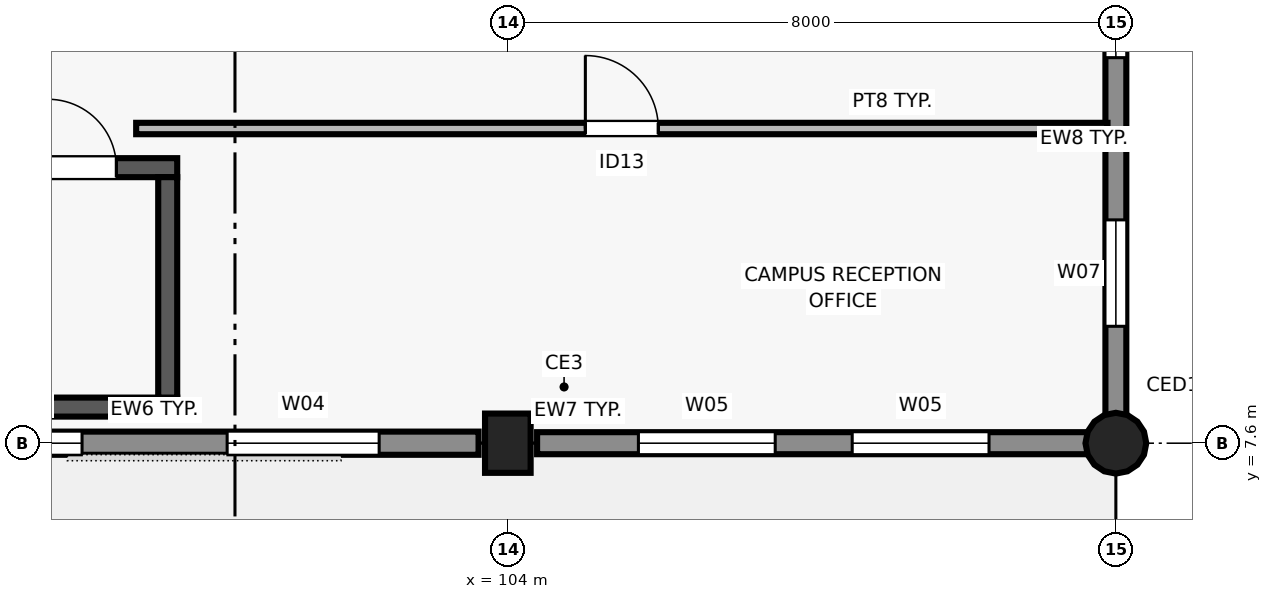
"""IFC4 building model, lengths in metres.
Left out: names, types, materials, properties, quantities, classifications, styles, units other than length and angle.
Written with IfcOpenShell. Run it as: python <this file> out.ifc"""

import sys

from ifc_helpers import new_model, si_unit, direction, frame, frame_2d, origin, origin_2d, place, context, subcontext, project, spatial, rectangle, circle, extrude, element, fill, save


model = new_model("IFC4")
c1 = context("Model", 3, precision=1e-05, world=origin(), true_north=direction((0.0, 1.0)))
c2 = subcontext(c1, "Body", "Model", "MODEL_VIEW")
j1 = project(units=[si_unit("LENGTHUNIT", "METRE"), si_unit("PLANEANGLEUNIT", "RADIAN")], contexts=[c1])
p1 = place(None, origin())
s1 = spatial("IfcSite", under=j1, at=p1, CompositionType="ELEMENT")
p2 = place(p1, origin())
s2 = spatial("IfcBuilding", under=s1, at=p2, CompositionType="ELEMENT")
p3 = place(p2, origin())
s3 = spatial("IfcBuildingStorey", under=s2, at=p3, CompositionType="ELEMENT", Elevation=0.0)
p4 = place(p3, frame((104.0, 7.6, 0.0), z_axis=(0.0, 0.0, 1.0), x_axis=(1.0, 0.0, 0.0)))
e1 = element("IfcColumn", 1, at=p4, inside=s3, PredefinedType="COLUMN", context=c2, shape_type="SweptSolid", body=[
    extrude(rectangle(XDim=0.78, YDim=0.6, at=origin_2d()), origin(), (0.0, 0.0, 1.0), 4.5),
])
p5 = place(p3, frame((112.0, 7.6, 0.0), z_axis=(0.0, 0.0, 1.0), x_axis=(1.0, 0.0, 0.0)))
e2 = element("IfcColumn", 2, at=p5, inside=s3, PredefinedType="COLUMN", context=c2, shape_type="SweptSolid", body=[
    extrude(circle(Radius=0.4, at=origin_2d()), origin(), (0.0, 0.0, 1.0), 4.5),
])
p6 = place(p3, frame((96.395, 7.6, 0.0), z_axis=(0.0, 0.0, 1.0), x_axis=(1.0, 0.0, 0.0)))
e3 = element("IfcWall", 3, at=p6, inside=s3, PredefinedType="SOLIDWALL", context=c2, shape_type="SweptSolid", body=[
    extrude(rectangle(XDim=7.22, YDim=0.305, at=frame_2d((3.61, 0.0))), origin(), (0.0, 0.0, 1.0), 4.22),
])
p7 = place(p6, frame((0.603, 0.0, 0.9)))
e4 = element("IfcOpeningElement", 4, at=p7, cuts=e3, PredefinedType="OPENING", context=c2, shape_type="SweptSolid", body=[
    extrude(rectangle(XDim=1.4, YDim=1.8, at=frame_2d((0.7, 0.9))), frame((0.0, 0.162, 0.0), z_axis=(0.0, -1.0, 0.0), x_axis=(1.0, 0.0, 0.0)), (0.0, 0.0, 1.0), 0.325),
])
p8 = place(p6, frame((3.912, 0.0, 0.9)))
e5 = element("IfcOpeningElement", 5, at=p8, cuts=e3, PredefinedType="OPENING", context=c2, shape_type="SweptSolid", body=[
    extrude(rectangle(XDim=2.0, YDim=1.8, at=frame_2d((1.0, 0.9))), frame((0.0, 0.162, 0.0), z_axis=(0.0, -1.0, 0.0), x_axis=(1.0, 0.0, 0.0)), (0.0, 0.0, 1.0), 0.325),
])
p9 = place(p3, frame((104.385, 7.6, 0.0), z_axis=(0.0, 0.0, 1.0), x_axis=(1.0, 0.0, 0.0)))
e6 = element("IfcWall", 6, at=p9, inside=s3, PredefinedType="SOLIDWALL", context=c2, shape_type="SweptSolid", body=[
    extrude(rectangle(XDim=7.279, YDim=0.29, at=frame_2d((3.64, 0.0))), origin(), (0.0, 0.0, 1.0), 3.54),
])
p10 = place(p9, frame((1.333, 0.0, 0.9)))
e7 = element("IfcOpeningElement", 7, at=p10, cuts=e6, PredefinedType="OPENING", context=c2, shape_type="SweptSolid", body=[
    extrude(rectangle(XDim=1.8, YDim=1.8, at=frame_2d((0.9, 0.9))), frame((0.0, 0.155, 0.0), z_axis=(0.0, -1.0, 0.0), x_axis=(1.0, 0.0, 0.0)), (0.0, 0.0, 1.0), 0.31),
])
p11 = place(p9, frame((4.146, 0.0, 0.9)))
e8 = element("IfcOpeningElement", 8, at=p11, cuts=e6, PredefinedType="OPENING", context=c2, shape_type="SweptSolid", body=[
    extrude(rectangle(XDim=1.8, YDim=1.8, at=frame_2d((0.9, 0.9))), frame((0.0, 0.155, 0.0), z_axis=(0.0, -1.0, 0.0), x_axis=(1.0, 0.0, 0.0)), (0.0, 0.0, 1.0), 0.31),
])
p12 = place(p3, frame((112.0, 7.936, 0.0), z_axis=(0.0, 0.0, 1.0), x_axis=(0.0, 1.0, 0.0)))
e9 = element("IfcWall", 9, at=p12, inside=s3, PredefinedType="SOLIDWALL", context=c2, shape_type="SweptSolid", body=[
    extrude(rectangle(XDim=6.869, YDim=0.275, at=frame_2d((3.435, 0.0))), origin(), (0.0, 0.0, 1.0), 3.76),
])
p13 = place(p12, frame((1.202, 0.0, 0.9)))
e10 = element("IfcOpeningElement", 10, at=p13, cuts=e9, PredefinedType="OPENING", context=c2, shape_type="SweptSolid", body=[
    extrude(rectangle(XDim=1.4, YDim=1.8, at=frame_2d((0.7, 0.9))), frame((0.0, 0.147, 0.0), z_axis=(0.0, -1.0, 0.0), x_axis=(1.0, 0.0, 0.0)), (0.0, 0.0, 1.0), 0.295),
])
p14 = place(p12, frame((4.736, 0.0, 0.9)))
e11 = element("IfcOpeningElement", 11, at=p14, cuts=e9, PredefinedType="OPENING", context=c2, shape_type="SweptSolid", body=[
    extrude(rectangle(XDim=1.2, YDim=1.8, at=frame_2d((0.6, 0.9))), frame((0.0, 0.147, 0.0), z_axis=(0.0, -1.0, 0.0), x_axis=(1.0, 0.0, 0.0)), (0.0, 0.0, 1.0), 0.295),
])
p15 = place(p3, frame((97.15, 8.075, 0.0), z_axis=(0.0, 0.0, 1.0), x_axis=(1.0, 0.0, 0.0)))
e12 = element("IfcWall", 12, at=p15, inside=s3, PredefinedType="SHEAR", context=c2, shape_type="SweptSolid", body=[
    extrude(rectangle(XDim=2.5, YDim=0.25, at=frame_2d((1.25, 0.0))), origin(), (0.0, 0.0, 1.0), 4.22),
])
p16 = place(p3, frame((97.15, 11.225, 0.0), z_axis=(0.0, 0.0, 1.0), x_axis=(1.0, 0.0, 0.0)))
e13 = element("IfcWall", 13, at=p16, inside=s3, PredefinedType="SHEAR", context=c2, shape_type="SweptSolid", body=[
    extrude(rectangle(XDim=2.5, YDim=0.25, at=frame_2d((1.25, 0.0))), origin(), (0.0, 0.0, 1.0), 4.22),
])
p17 = place(p16, frame((0.8, 0.0, 0.0)))
e14 = element("IfcOpeningElement", 14, at=p17, cuts=e13, PredefinedType="OPENING", context=c2, shape_type="SweptSolid", body=[
    extrude(rectangle(XDim=0.9, YDim=2.05, at=frame_2d((0.45, 1.025))), frame((0.0, 0.135, 0.0), z_axis=(0.0, -1.0, 0.0), x_axis=(1.0, 0.0, 0.0)), (0.0, 0.0, 1.0), 0.27),
])
p18 = place(p3, frame((99.525, 8.2, 0.0), z_axis=(0.0, 0.0, 1.0), x_axis=(0.0, 1.0, 0.0)))
e15 = element("IfcWall", 15, at=p18, inside=s3, PredefinedType="SHEAR", context=c2, shape_type="SweptSolid", body=[
    extrude(rectangle(XDim=2.9, YDim=0.25, at=frame_2d((1.45, 0.0))), origin(), (0.0, 0.0, 1.0), 4.22),
])
p19 = place(p3, frame((99.11, 11.74, 0.0), z_axis=(0.0, 0.0, 1.0), x_axis=(1.0, 0.0, 0.0)))
e16 = element("IfcWall", 16, at=p19, inside=s3, PredefinedType="PARTITIONING", context=c2, shape_type="SweptSolid", body=[
    extrude(rectangle(XDim=12.78, YDim=0.15, at=frame_2d((6.39, 0.0))), origin(), (0.0, 0.0, 1.0), 4.2),
])
p20 = place(p19, frame((5.91, 0.0, 0.0)))
e17 = element("IfcOpeningElement", 17, at=p20, cuts=e16, PredefinedType="OPENING", context=c2, shape_type="SweptSolid", body=[
    extrude(rectangle(XDim=0.96, YDim=2.15, at=frame_2d((0.48, 1.075))), frame((0.0, 0.085, 0.0), z_axis=(0.0, -1.0, 0.0), x_axis=(1.0, 0.0, 0.0)), (0.0, 0.0, 1.0), 0.17),
])
p21 = place(p7, origin())
e18 = element("IfcWindow", 18, at=p21, inside=s3, PartitioningType="SINGLE_PANEL", PredefinedType="WINDOW", context=c2, shape_type="SweptSolid", body=[
    extrude(rectangle(XDim=1.4, YDim=1.8, at=frame_2d((0.7, 0.9))), frame((0.0, 0.03, 0.0), z_axis=(0.0, -1.0, 0.0), x_axis=(1.0, 0.0, 0.0)), (0.0, 0.0, 1.0), 0.06),
])
fill(e4, e18)
p22 = place(p8, origin())
e19 = element("IfcWindow", 19, at=p22, inside=s3, PartitioningType="SINGLE_PANEL", PredefinedType="WINDOW", context=c2, shape_type="SweptSolid", body=[
    extrude(rectangle(XDim=2.0, YDim=1.8, at=frame_2d((1.0, 0.9))), frame((0.0, 0.03, 0.0), z_axis=(0.0, -1.0, 0.0), x_axis=(1.0, 0.0, 0.0)), (0.0, 0.0, 1.0), 0.06),
])
fill(e5, e19)
p23 = place(p10, origin())
e20 = element("IfcWindow", 20, at=p23, inside=s3, PartitioningType="SINGLE_PANEL", PredefinedType="WINDOW", context=c2, shape_type="SweptSolid", body=[
    extrude(rectangle(XDim=1.8, YDim=1.8, at=frame_2d((0.9, 0.9))), frame((0.0, 0.03, 0.0), z_axis=(0.0, -1.0, 0.0), x_axis=(1.0, 0.0, 0.0)), (0.0, 0.0, 1.0), 0.06),
])
fill(e7, e20)
p24 = place(p11, origin())
e21 = element("IfcWindow", 21, at=p24, inside=s3, PartitioningType="SINGLE_PANEL", PredefinedType="WINDOW", context=c2, shape_type="SweptSolid", body=[
    extrude(rectangle(XDim=1.8, YDim=1.8, at=frame_2d((0.9, 0.9))), frame((0.0, 0.03, 0.0), z_axis=(0.0, -1.0, 0.0), x_axis=(1.0, 0.0, 0.0)), (0.0, 0.0, 1.0), 0.06),
])
fill(e8, e21)
p25 = place(p13, origin())
e22 = element("IfcWindow", 22, at=p25, inside=s3, PartitioningType="SINGLE_PANEL", PredefinedType="WINDOW", context=c2, shape_type="SweptSolid", body=[
    extrude(rectangle(XDim=1.4, YDim=1.8, at=frame_2d((0.7, 0.9))), frame((0.0, 0.03, 0.0), z_axis=(0.0, -1.0, 0.0), x_axis=(1.0, 0.0, 0.0)), (0.0, 0.0, 1.0), 0.06),
])
fill(e10, e22)
p26 = place(p14, origin())
e23 = element("IfcWindow", 23, at=p26, inside=s3, PartitioningType="SINGLE_PANEL", PredefinedType="WINDOW", context=c2, shape_type="SweptSolid", body=[
    extrude(rectangle(XDim=1.2, YDim=1.8, at=frame_2d((0.6, 0.9))), frame((0.0, 0.03, 0.0), z_axis=(0.0, -1.0, 0.0), x_axis=(1.0, 0.0, 0.0)), (0.0, 0.0, 1.0), 0.06),
])
fill(e11, e23)
p27 = place(p17, origin())
e24 = element("IfcDoor", 24, at=p27, inside=s3, OperationType="SINGLE_SWING_LEFT", PredefinedType="DOOR", context=c2, shape_type="SweptSolid", body=[
    extrude(rectangle(XDim=0.9, YDim=2.05, at=frame_2d((0.45, 1.025))), frame((0.0, 0.025, 0.0), z_axis=(0.0, -1.0, 0.0), x_axis=(1.0, 0.0, 0.0)), (0.0, 0.0, 1.0), 0.05),
])
fill(e14, e24)
p28 = place(p20, origin())
e25 = element("IfcDoor", 25, at=p28, inside=s3, OperationType="SINGLE_SWING_LEFT", PredefinedType="DOOR", context=c2, shape_type="SweptSolid", body=[
    extrude(rectangle(XDim=0.96, YDim=2.15, at=frame_2d((0.48, 1.075))), frame((0.0, 0.025, 0.0), z_axis=(0.0, -1.0, 0.0), x_axis=(1.0, 0.0, 0.0)), (0.0, 0.0, 1.0), 0.05),
])
fill(e17, e25)
save(model, sys.argv[1])
